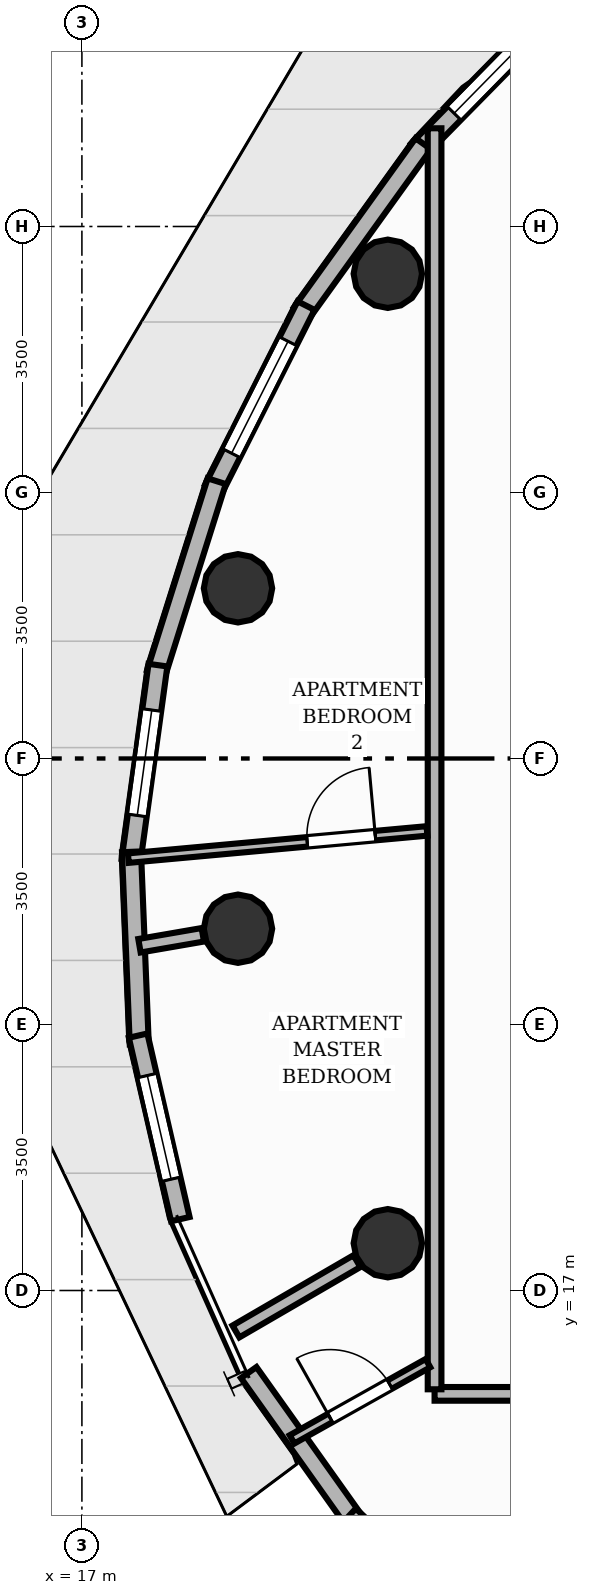
"""IFC4 building model, lengths in metres.
Left out: names, types, materials, properties, quantities, classifications, styles, units other than length and angle.
Written with IfcOpenShell. Run it as: python <this file> out.ifc"""

import sys

from ifc_helpers import new_model, si_unit, direction, frame, frame_2d, origin, origin_2d, place, context, subcontext, project, spatial, rectangle, circle, extrude, element, fill, save


model = new_model("IFC4")
c1 = context("Model", 3, precision=1e-05, world=origin(), true_north=direction((0.0, 1.0)))
c2 = subcontext(c1, "Body", "Model", "MODEL_VIEW")
j1 = project(units=[si_unit("LENGTHUNIT", "METRE"), si_unit("PLANEANGLEUNIT", "RADIAN")], contexts=[c1])
p1 = place(None, origin())
s1 = spatial("IfcSite", under=j1, at=p1, CompositionType="ELEMENT")
p2 = place(p1, origin())
s2 = spatial("IfcBuilding", under=s1, at=p2, CompositionType="ELEMENT")
p3 = place(p2, frame((0.0, 0.0, 166.24)))
s3 = spatial("IfcBuildingStorey", under=s2, at=p3, CompositionType="ELEMENT", Elevation=166.24)
for number, where, z_axis, x_axis in (
    (1, (21.025, 30.378, 0.0), (0.0, 0.0, 1.0), (1.0, 0.0, 0.0)),
    (2, (19.054, 26.24, 0.0), (0.0, 0.0, 1.0), (1.0, 0.0, 0.0)),
    (3, (19.054, 21.76, 0.0), (0.0, 0.0, 1.0), (1.0, 0.0, 0.0)),
    (4, (21.025, 17.622, 0.0), (0.0, 0.0, 1.0), (1.0, 0.0, 0.0)),
):
    element("IfcColumn", number, at=place(p3, frame(where, z_axis=z_axis, x_axis=x_axis)), inside=s3, PredefinedType="COLUMN", context=c2, shape_type="SweptSolid", body=[
        extrude(circle(Radius=0.45, at=origin_2d()), origin(), (0.0, 0.0, 1.0), 3.2),
    ])
p4 = place(p3, frame((21.421, 32.005, 0.0), z_axis=(0.0, 0.0, 1.0), x_axis=(0.700794099323, 0.713363603189, 0.0)))
e5 = element("IfcWall", 5, at=p4, inside=s3, PredefinedType="SOLIDWALL", context=c2, shape_type="SweptSolid", body=[
    extrude(rectangle(XDim=2.758, YDim=0.25, at=frame_2d((1.379, 0.0))), origin(), (0.0, 0.0, 1.0), 2.96),
])
p5 = place(p4, frame((0.679, 0.0, 0.85)))
e6 = element("IfcOpeningElement", 6, at=p5, cuts=e5, PredefinedType="OPENING", context=c2, shape_type="SweptSolid", body=[
    extrude(rectangle(XDim=1.4, YDim=1.55, at=frame_2d((0.7, 0.775))), frame((0.0, 0.135, 0.0), z_axis=(0.0, -1.0, 0.0), x_axis=(1.0, 0.0, 0.0)), (0.0, 0.0, 1.0), 0.27),
])
p6 = place(p3, frame((19.892, 29.865, 0.0), z_axis=(0.0, 0.0, 1.0), x_axis=(0.583975860001, 0.811771023711, 0.0)))
e7 = element("IfcWall", 7, at=p6, inside=s3, PredefinedType="SOLIDWALL", context=c2, shape_type="SweptSolid", body=[
    extrude(rectangle(XDim=2.738, YDim=0.25, at=frame_2d((1.369, 0.0))), origin(), (0.0, 0.0, 1.0), 2.96),
])
p7 = place(p3, frame((18.732, 27.547, 0.0), z_axis=(0.0, 0.0, 1.0), x_axis=(0.450391703917, 0.892831066352, 0.0)))
e8 = element("IfcWall", 8, at=p7, inside=s3, PredefinedType="SOLIDWALL", context=c2, shape_type="SweptSolid", body=[
    extrude(rectangle(XDim=2.702, YDim=0.25, at=frame_2d((1.351, 0.0))), origin(), (0.0, 0.0, 1.0), 2.96),
])
p8 = place(p7, frame((0.526, 0.0, 0.85)))
e9 = element("IfcOpeningElement", 9, at=p8, cuts=e8, PredefinedType="OPENING", context=c2, shape_type="SweptSolid", body=[
    extrude(rectangle(XDim=1.65, YDim=1.55, at=frame_2d((0.825, 0.775))), frame((0.0, 0.135, 0.0), z_axis=(0.0, -1.0, 0.0), x_axis=(1.0, 0.0, 0.0)), (0.0, 0.0, 1.0), 0.27),
])
p9 = place(p3, frame((17.976, 25.12, 0.0), z_axis=(0.0, 0.0, 1.0), x_axis=(0.300796358401, 0.953688392911, 0.0)))
e10 = element("IfcWall", 10, at=p9, inside=s3, PredefinedType="SOLIDWALL", context=c2, shape_type="SweptSolid", body=[
    extrude(rectangle(XDim=2.651, YDim=0.25, at=frame_2d((1.325, 0.0))), origin(), (0.0, 0.0, 1.0), 2.96),
])
p10 = place(p3, frame((17.647, 22.66, 0.0), z_axis=(0.0, 0.0, 1.0), x_axis=(0.136289981327, 0.990668986589, 0.0)))
e11 = element("IfcWall", 11, at=p10, inside=s3, PredefinedType="SOLIDWALL", context=c2, shape_type="SweptSolid", body=[
    extrude(rectangle(XDim=2.592, YDim=0.25, at=frame_2d((1.296, 0.0))), origin(), (0.0, 0.0, 1.0), 2.96),
])
p11 = place(p10, frame((0.596, 0.0, 0.85)))
e12 = element("IfcOpeningElement", 12, at=p11, cuts=e11, PredefinedType="OPENING", context=c2, shape_type="SweptSolid", body=[
    extrude(rectangle(XDim=1.4, YDim=1.55, at=frame_2d((0.7, 0.775))), frame((0.0, 0.135, 0.0), z_axis=(0.0, -1.0, 0.0), x_axis=(1.0, 0.0, 0.0)), (0.0, 0.0, 1.0), 0.27),
])
p12 = place(p3, frame((17.755, 20.242, 0.0), z_axis=(0.0, 0.0, 1.0), x_axis=(-0.040399298921, 0.999183615081, 0.0)))
e13 = element("IfcWall", 13, at=p12, inside=s3, PredefinedType="SOLIDWALL", context=c2, shape_type="SweptSolid", body=[
    extrude(rectangle(XDim=2.532, YDim=0.25, at=frame_2d((1.266, 0.0))), origin(), (0.0, 0.0, 1.0), 2.96),
])
p13 = place(p3, frame((18.295, 17.939, 0.0), z_axis=(0.0, 0.0, 1.0), x_axis=(-0.224175769227, 0.974548728639, 0.0)))
e14 = element("IfcWall", 14, at=p13, inside=s3, PredefinedType="SOLIDWALL", context=c2, shape_type="SweptSolid", body=[
    extrude(rectangle(XDim=2.478, YDim=0.25, at=frame_2d((1.239, 0.0))), origin(), (0.0, 0.0, 1.0), 2.96),
])
p14 = place(p13, frame((0.539, 0.0, 0.85)))
e15 = element("IfcOpeningElement", 15, at=p14, cuts=e14, PredefinedType="OPENING", context=c2, shape_type="SweptSolid", body=[
    extrude(rectangle(XDim=1.4, YDim=1.55, at=frame_2d((0.7, 0.775))), frame((0.0, 0.135, 0.0), z_axis=(0.0, -1.0, 0.0), x_axis=(1.0, 0.0, 0.0)), (0.0, 0.0, 1.0), 0.27),
])
p15 = place(p3, frame((20.594, 13.953, 0.0), z_axis=(0.0, 0.0, 1.0), x_axis=(-0.579505880656, 0.814968057217, 0.0)))
e16 = element("IfcWall", 16, at=p15, inside=s3, PredefinedType="SOLIDWALL", context=c2, shape_type="SweptSolid", body=[
    extrude(rectangle(XDim=2.415, YDim=0.25, at=frame_2d((1.208, 0.0))), origin(), (0.0, 0.0, 1.0), 2.96),
])
p16 = place(p3, frame((22.282, 12.389, 0.0), z_axis=(0.0, 0.0, 1.0), x_axis=(-0.730224222865, 0.683207570465, 0.0)))
e17 = element("IfcWall", 17, at=p16, inside=s3, PredefinedType="SOLIDWALL", context=c2, shape_type="SweptSolid", body=[
    extrude(rectangle(XDim=2.415, YDim=0.25, at=frame_2d((1.207, 0.0))), origin(), (0.0, 0.0, 1.0), 2.96),
])
p17 = place(p3, frame((18.591, 21.68, 0.0), z_axis=(0.0, 0.0, 1.0), x_axis=(-0.985336508055, -0.170622290144, 0.0)))
e18 = element("IfcWall", 18, at=p17, inside=s3, PredefinedType="PARTITIONING", context=c2, shape_type="SweptSolid", body=[
    extrude(rectangle(XDim=0.846, YDim=0.18, at=frame_2d((0.423, 0.0))), origin(), (0.0, 0.0, 1.0), 2.403),
])
p18 = place(p3, frame((20.618, 17.386, 0.0), z_axis=(0.0, 0.0, 1.0), x_axis=(-0.864604991586, -0.502452195264, 0.0)))
e19 = element("IfcWall", 19, at=p18, inside=s3, PredefinedType="PARTITIONING", context=c2, shape_type="SweptSolid", body=[
    extrude(rectangle(XDim=1.841, YDim=0.18, at=frame_2d((0.92, 0.0))), origin(), (0.0, 0.0, 1.0), 2.403),
])
p19 = place(p3, frame((29.294, 15.64, 0.0), z_axis=(0.0, 0.0, 1.0), x_axis=(-1.0, 0.0, 0.0)))
e20 = element("IfcWall", 20, at=p19, inside=s3, PredefinedType="PARTITIONING", context=c2, shape_type="SweptSolid", body=[
    extrude(rectangle(XDim=7.655, YDim=0.18, at=frame_2d((3.827, 0.0))), origin(), (0.0, 0.0, 1.0), 2.955),
])
p20 = place(p19, frame((2.742, 0.0, 0.0)))
e21 = element("IfcOpeningElement", 21, at=p20, cuts=e20, PredefinedType="OPENING", context=c2, shape_type="SweptSolid", body=[
    extrude(rectangle(XDim=1.05, YDim=2.15, at=frame_2d((0.525, 1.075))), frame((0.0, 0.1, 0.0), z_axis=(0.0, -1.0, 0.0), x_axis=(1.0, 0.0, 0.0)), (0.0, 0.0, 1.0), 0.2),
])
p21 = place(p3, frame((21.64, 15.7, 0.0), z_axis=(0.0, 0.0, 1.0), x_axis=(0.0, 1.0, 0.0)))
e22 = element("IfcWall", 22, at=p21, inside=s3, PredefinedType="PARTITIONING", context=c2, shape_type="SweptSolid", body=[
    extrude(rectangle(XDim=16.592, YDim=0.18, at=frame_2d((8.296, 0.0))), origin(), (0.0, 0.0, 1.0), 2.955),
])
p22 = place(p3, frame((19.765, 15.041, 0.0), z_axis=(0.0, 0.0, 1.0), x_axis=(0.872144280578, 0.489248764798, 0.0)))
e23 = element("IfcWall", 23, at=p22, inside=s3, PredefinedType="PARTITIONING", context=c2, shape_type="SweptSolid", body=[
    extrude(rectangle(XDim=2.05, YDim=0.125, at=frame_2d((1.025, 0.0))), origin(), (0.0, 0.0, 1.0), 2.955),
])
p23 = place(p22, frame((0.575, 0.0, 0.0)))
e24 = element("IfcOpeningElement", 24, at=p23, cuts=e23, PredefinedType="OPENING", context=c2, shape_type="SweptSolid", body=[
    extrude(rectangle(XDim=0.9, YDim=2.1, at=frame_2d((0.45, 1.05))), frame((0.0, 0.073, 0.0), z_axis=(0.0, -1.0, 0.0), x_axis=(1.0, 0.0, 0.0)), (0.0, 0.0, 1.0), 0.145),
])
p24 = place(p3, frame((17.611, 22.689, 0.0), z_axis=(0.0, 0.0, 1.0), x_axis=(0.995872387558, 0.090764462758, 0.0)))
e25 = element("IfcWall", 25, at=p24, inside=s3, PredefinedType="PARTITIONING", context=c2, shape_type="SweptSolid", body=[
    extrude(rectangle(XDim=3.946, YDim=0.125, at=frame_2d((1.973, 0.0))), origin(), (0.0, 0.0, 1.0), 2.955),
])
p25 = place(p24, frame((2.363, 0.0, 0.0)))
e26 = element("IfcOpeningElement", 26, at=p25, cuts=e25, PredefinedType="OPENING", context=c2, shape_type="SweptSolid", body=[
    extrude(rectangle(XDim=0.9, YDim=2.1, at=frame_2d((0.45, 1.05))), frame((0.0, 0.073, 0.0), z_axis=(0.0, -1.0, 0.0), x_axis=(1.0, 0.0, 0.0)), (0.0, 0.0, 1.0), 0.145),
])
p26 = place(p5, origin())
e27 = element("IfcWindow", 27, at=p26, inside=s3, PartitioningType="SINGLE_PANEL", PredefinedType="WINDOW", context=c2, shape_type="SweptSolid", body=[
    extrude(rectangle(XDim=1.4, YDim=1.55, at=frame_2d((0.7, 0.775))), frame((0.0, 0.03, 0.0), z_axis=(0.0, -1.0, 0.0), x_axis=(1.0, 0.0, 0.0)), (0.0, 0.0, 1.0), 0.06),
])
fill(e6, e27)
p27 = place(p8, origin())
e28 = element("IfcWindow", 28, at=p27, inside=s3, PartitioningType="SINGLE_PANEL", PredefinedType="WINDOW", context=c2, shape_type="SweptSolid", body=[
    extrude(rectangle(XDim=1.65, YDim=1.55, at=frame_2d((0.825, 0.775))), frame((0.0, 0.03, 0.0), z_axis=(0.0, -1.0, 0.0), x_axis=(1.0, 0.0, 0.0)), (0.0, 0.0, 1.0), 0.06),
])
fill(e9, e28)
p28 = place(p11, origin())
e29 = element("IfcWindow", 29, at=p28, inside=s3, PartitioningType="SINGLE_PANEL", PredefinedType="WINDOW", context=c2, shape_type="SweptSolid", body=[
    extrude(rectangle(XDim=1.4, YDim=1.55, at=frame_2d((0.7, 0.775))), frame((0.0, 0.03, 0.0), z_axis=(0.0, -1.0, 0.0), x_axis=(1.0, 0.0, 0.0)), (0.0, 0.0, 1.0), 0.06),
])
fill(e12, e29)
p29 = place(p14, origin())
e30 = element("IfcWindow", 30, at=p29, inside=s3, PartitioningType="SINGLE_PANEL", PredefinedType="WINDOW", context=c2, shape_type="SweptSolid", body=[
    extrude(rectangle(XDim=1.4, YDim=1.55, at=frame_2d((0.7, 0.775))), frame((0.0, 0.03, 0.0), z_axis=(0.0, -1.0, 0.0), x_axis=(1.0, 0.0, 0.0)), (0.0, 0.0, 1.0), 0.06),
])
fill(e15, e30)
p30 = place(p23, origin())
e31 = element("IfcDoor", 31, at=p30, inside=s3, OperationType="SINGLE_SWING_LEFT", PredefinedType="DOOR", context=c2, shape_type="SweptSolid", body=[
    extrude(rectangle(XDim=0.9, YDim=2.1, at=frame_2d((0.45, 1.05))), frame((0.0, 0.025, 0.0), z_axis=(0.0, -1.0, 0.0), x_axis=(1.0, 0.0, 0.0)), (0.0, 0.0, 1.0), 0.05),
])
fill(e24, e31)
p31 = place(p25, origin())
e32 = element("IfcDoor", 32, at=p31, inside=s3, OperationType="SINGLE_SWING_RIGHT", PredefinedType="DOOR", context=c2, shape_type="SweptSolid", body=[
    extrude(rectangle(XDim=0.9, YDim=2.1, at=frame_2d((0.45, 1.05))), frame((0.0, 0.025, 0.0), z_axis=(0.0, -1.0, 0.0), x_axis=(1.0, 0.0, 0.0)), (0.0, 0.0, 1.0), 0.05),
])
fill(e26, e32)
save(model, sys.argv[1])
